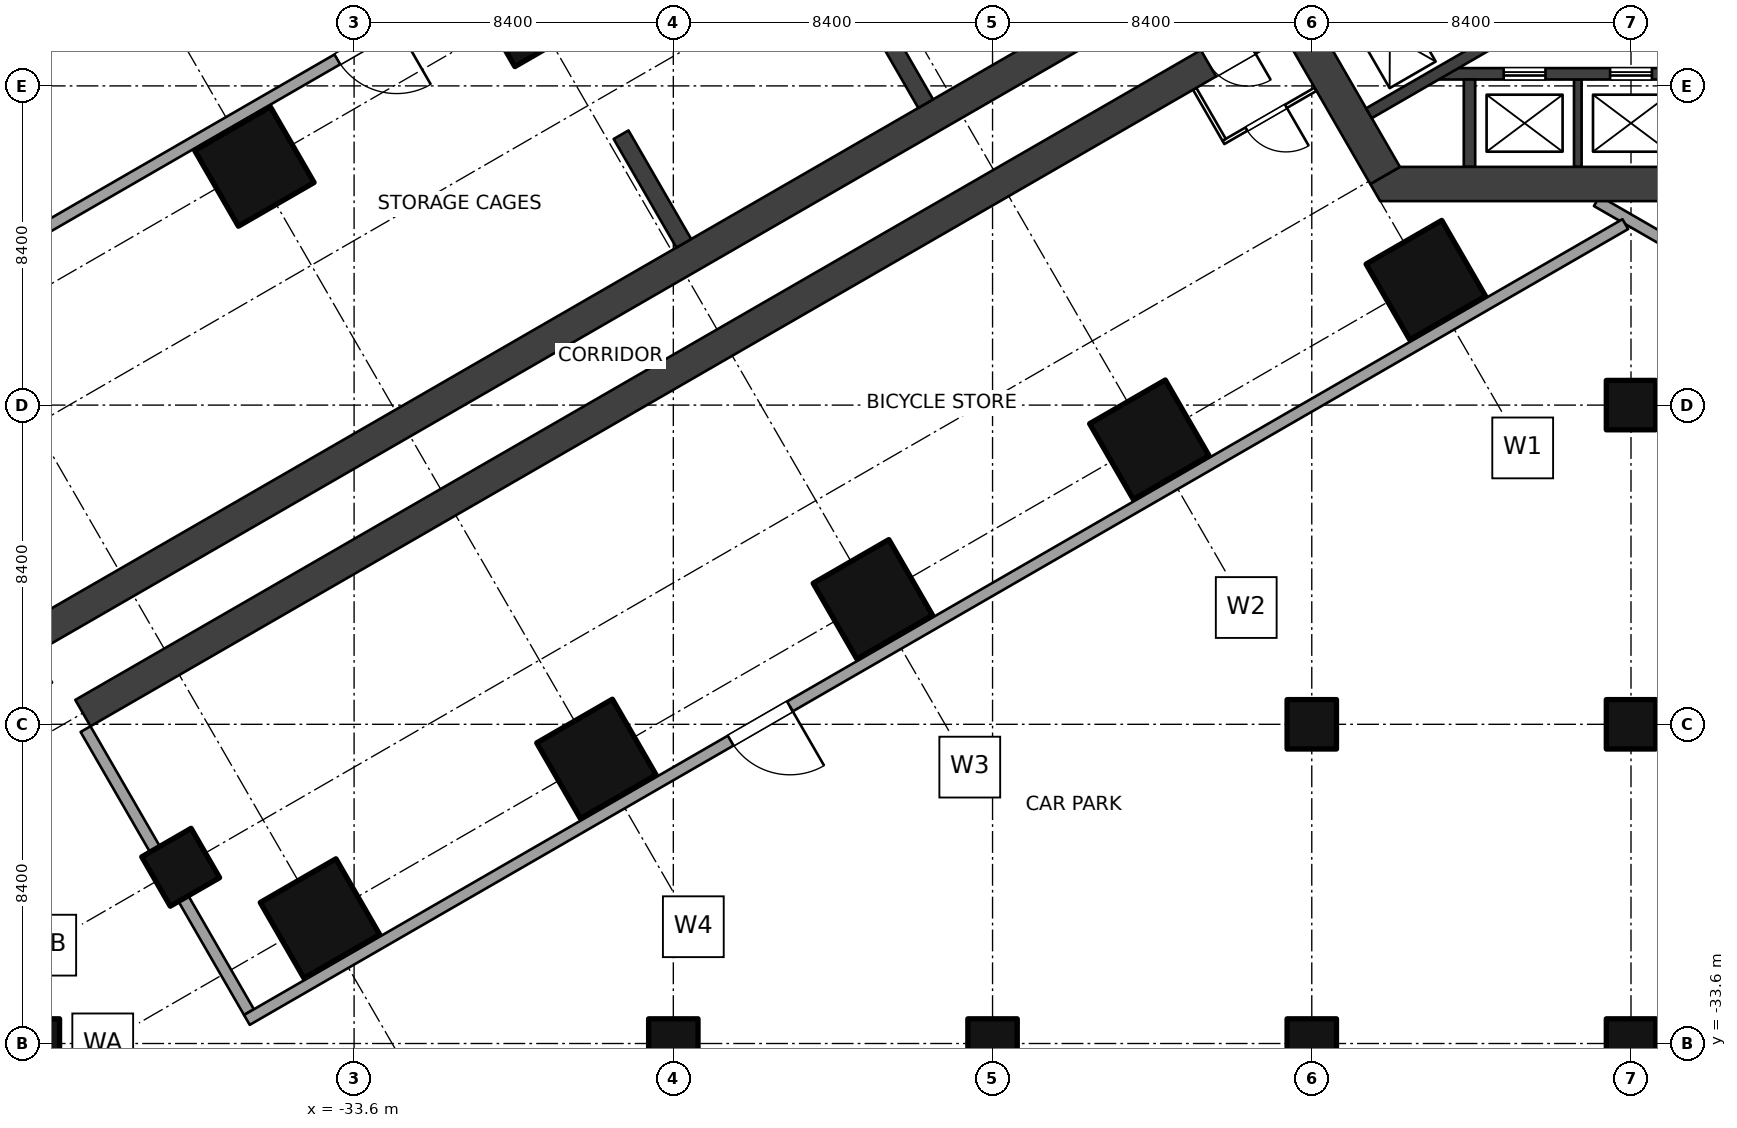
"""IFC4 building model, lengths in metres.
Left out: names, types, materials, properties, quantities, classifications, styles, units other than length and angle.
Written with IfcOpenShell. Run it as: python <this file> out.ifc"""

import sys

from ifc_helpers import new_model, si_unit, direction, frame, frame_2d, origin, origin_2d, place, context, subcontext, project, spatial, polyline, rectangle, outline, extrude, element, fill, save


model = new_model("IFC4")
c1 = context("Model", 3, precision=1e-05, world=origin(), true_north=direction((0.0, 1.0)))
c2 = subcontext(c1, "Body", "Model", "MODEL_VIEW")
j1 = project(units=[si_unit("LENGTHUNIT", "METRE"), si_unit("PLANEANGLEUNIT", "RADIAN")], contexts=[c1])
p1 = place(None, origin())
s1 = spatial("IfcSite", under=j1, at=p1, CompositionType="ELEMENT")
p2 = place(p1, origin())
s2 = spatial("IfcBuilding", under=s1, at=p2, CompositionType="ELEMENT")
p3 = place(p2, frame((0.0, 0.0, -3.5)))
s3 = spatial("IfcBuildingStorey", under=s2, at=p3, CompositionType="ELEMENT", Elevation=-3.5)
for number, where, z_axis, x_axis in (
    (1, (-5.4, -13.51, 0.0), (0.0, 0.0, 1.0), (-0.5, 0.866, 0.0)),
    (2, (-12.675, -17.71, 0.0), (0.0, 0.0, 1.0), (-0.5, 0.866, 0.0)),
    (3, (-19.949, -21.91, 0.0), (0.0, 0.0, 1.0), (-0.5, 0.866, 0.0)),
    (4, (-28.949, -6.322, 0.0), (0.0, 0.0, 1.0), (-0.5, 0.866, 0.0)),
    (5, (-27.224, -26.11, 0.0), (0.0, 0.0, 1.0), (-0.5, 0.866, 0.0)),
    (6, (-36.224, -10.521, 0.0), (0.0, 0.0, 1.0), (-0.5, 0.866, 0.0)),
    (7, (-34.499, -30.31, 0.0), (0.0, 0.0, 1.0), (-0.5, 0.866, 0.0)),
):
    element("IfcColumn", number, at=place(p3, frame(where, z_axis=z_axis, x_axis=x_axis)), inside=s3, PredefinedType="COLUMN", context=c2, shape_type="SweptSolid", body=[
        extrude(rectangle(XDim=2.3, YDim=2.3, at=origin_2d()), origin(), (0.0, 0.0, 1.0), 3.5),
    ])
p4 = place(p3, frame((-38.164, -28.962, 0.0), z_axis=(0.0, 0.0, 1.0), x_axis=(-0.5, 0.866025403784, 0.0)))
e8 = element("IfcColumn", 8, at=p4, inside=s3, PredefinedType="COLUMN", context=c2, shape_type="SweptSolid", body=[
    extrude(rectangle(XDim=1.5, YDim=1.5, at=origin_2d()), origin(), (0.0, 0.0, 1.0), 3.5),
])
for number, where, z_axis, x_axis in (
    (9, (-42.0, -33.6, 0.0), (0.0, 0.0, 1.0), (1.0, 0.0, 0.0)),
    (10, (-25.2, -33.6, 0.0), (0.0, 0.0, 1.0), (1.0, 0.0, 0.0)),
    (11, (-16.8, -33.6, 0.0), (0.0, 0.0, 1.0), (1.0, 0.0, 0.0)),
    (12, (-8.4, -33.6, 0.0), (0.0, 0.0, 1.0), (1.0, 0.0, 0.0)),
    (13, (-8.4, -25.2, 0.0), (0.0, 0.0, 1.0), (1.0, 0.0, 0.0)),
    (14, (0.0, -33.6, 0.0), (0.0, 0.0, 1.0), (1.0, 0.0, 0.0)),
    (15, (0.0, -25.2, 0.0), (0.0, 0.0, 1.0), (1.0, 0.0, 0.0)),
    (16, (0.0, -16.8, 0.0), (0.0, 0.0, 1.0), (1.0, 0.0, 0.0)),
):
    element("IfcColumn", number, at=place(p3, frame(where, z_axis=z_axis, x_axis=x_axis)), inside=s3, PredefinedType="COLUMN", context=c2, shape_type="SweptSolid", body=[
        extrude(rectangle(XDim=1.3, YDim=1.3, at=origin_2d()), origin(), (0.0, 0.0, 1.0), 3.5),
    ])
p5 = place(p3, frame((-6.47, -10.757, 0.0), z_axis=(0.0, 0.0, 1.0), x_axis=(-0.499997612506, 0.8660267822, 0.0)))
e17 = element("IfcWall", 17, at=p5, inside=s3, PredefinedType="SHEAR", context=c2, shape_type="SweptSolid", body=[
    extrude(rectangle(XDim=12.161, YDim=0.9, at=frame_2d((6.08, 0.0))), origin(), (0.0, 0.0, 1.0), 3.5),
])
p6 = place(p5, frame((5.33, 0.0, 0.0)))
e18 = element("IfcOpeningElement", 18, at=p6, cuts=e17, PredefinedType="OPENING", context=c2, shape_type="SweptSolid", body=[
    extrude(rectangle(XDim=1.5, YDim=2.1, at=frame_2d((0.75, 1.05))), frame((0.0, 0.46, 0.0), z_axis=(0.0, -1.0, 0.0), x_axis=(1.0, 0.0, 0.0)), (0.0, 0.0, 1.0), 0.92),
])
p7 = place(p3, origin())
e19 = element("IfcWall", 19, at=p7, inside=s3, PredefinedType="SHEAR", context=c2, shape_type="SweptSolid", body=[
    extrude(outline(polyline([(-6.6, -11.432), (6.6, -11.432), (6.86, -10.981), (6.08, -10.531), (-6.08, -10.531), (-6.86, -10.981), (-6.6, -11.432)])), origin(), (0.0, 0.0, 1.0), 3.5),
])
p8 = place(p3, frame((-0.919, -5.669, 0.0), z_axis=(0.0, 0.0, 1.0), x_axis=(-0.866011800373, -0.500023561059, 0.0)))
e20 = element("IfcWall", 20, at=p8, inside=s3, PredefinedType="SHEAR", context=c2, shape_type="SweptSolid", body=[
    extrude(rectangle(XDim=6.902, YDim=0.3, at=frame_2d((3.451, 0.0))), origin(), (0.0, 0.0, 1.0), 3.5),
])
p9 = place(p3, frame((5.098, -8.082, 0.0), z_axis=(0.0, 0.0, 1.0), x_axis=(-1.0, 0.0, 0.0)))
e21 = element("IfcWall", 21, at=p9, inside=s3, PredefinedType="SHEAR", context=c2, shape_type="SweptSolid", body=[
    extrude(rectangle(XDim=10.195, YDim=0.3, at=frame_2d((5.098, 0.0))), origin(), (0.0, 0.0, 1.0), 3.5),
])
p10 = place(p9, frame((1.748, 0.0, 0.0)))
e22 = element("IfcOpeningElement", 22, at=p10, cuts=e21, PredefinedType="OPENING", context=c2, shape_type="SweptSolid", body=[
    extrude(rectangle(XDim=1.1, YDim=2.1, at=frame_2d((0.55, 1.05))), frame((0.0, 0.16, 0.0), z_axis=(0.0, -1.0, 0.0), x_axis=(1.0, 0.0, 0.0)), (0.0, 0.0, 1.0), 0.32),
])
p11 = place(p9, frame((4.548, 0.0, 0.0)))
e23 = element("IfcOpeningElement", 23, at=p11, cuts=e21, PredefinedType="OPENING", context=c2, shape_type="SweptSolid", body=[
    extrude(rectangle(XDim=1.1, YDim=2.1, at=frame_2d((0.55, 1.05))), frame((0.0, 0.16, 0.0), z_axis=(0.0, -1.0, 0.0), x_axis=(1.0, 0.0, 0.0)), (0.0, 0.0, 1.0), 0.32),
])
p12 = place(p9, frame((7.348, 0.0, 0.0)))
e24 = element("IfcOpeningElement", 24, at=p12, cuts=e21, PredefinedType="OPENING", context=c2, shape_type="SweptSolid", body=[
    extrude(rectangle(XDim=1.1, YDim=2.1, at=frame_2d((0.55, 1.05))), frame((0.0, 0.16, 0.0), z_axis=(0.0, -1.0, 0.0), x_axis=(1.0, 0.0, 0.0)), (0.0, 0.0, 1.0), 0.32),
])
p13 = place(p3, frame((-4.25, -8.231, 0.0), z_axis=(0.0, 0.0, 1.0), x_axis=(0.0, -1.0, 0.0)))
e25 = element("IfcWall", 25, at=p13, inside=s3, PredefinedType="SHEAR", context=c2, shape_type="SweptSolid", body=[
    extrude(rectangle(XDim=2.3, YDim=0.3, at=frame_2d((1.15, 0.0))), origin(), (0.0, 0.0, 1.0), 3.5),
])
p14 = place(p3, frame((-1.4, -8.231, 0.0), z_axis=(0.0, 0.0, 1.0), x_axis=(0.0, -1.0, 0.0)))
e26 = element("IfcWall", 26, at=p14, inside=s3, PredefinedType="SHEAR", context=c2, shape_type="SweptSolid", body=[
    extrude(rectangle(XDim=2.3, YDim=0.2, at=frame_2d((1.15, 0.0))), origin(), (0.0, 0.0, 1.0), 3.5),
])
p15 = place(p3, frame((-8.91, -6.53, 0.0), z_axis=(0.0, 0.0, 1.0), x_axis=(-0.866025284237, -0.500000207062, 0.0)))
e27 = element("IfcWall", 27, at=p15, inside=s3, PredefinedType="SHEAR", context=c2, shape_type="SweptSolid", body=[
    extrude(rectangle(XDim=36.75, YDim=0.8, at=frame_2d((18.375, 0.0))), origin(), (0.0, 0.0, 1.0), 3.5),
])
p16 = place(p15, frame((1.35, 0.0, 0.0)))
e28 = element("IfcOpeningElement", 28, at=p16, cuts=e27, PredefinedType="OPENING", context=c2, shape_type="SweptSolid", body=[
    extrude(rectangle(XDim=1.2, YDim=2.1, at=frame_2d((0.6, 1.05))), frame((0.0, 0.41, 0.0), z_axis=(0.0, -1.0, 0.0), x_axis=(1.0, 0.0, 0.0)), (0.0, 0.0, 1.0), 0.82),
])
p17 = place(p3, frame((-10.11, -4.451, 0.0), z_axis=(0.0, 0.0, 1.0), x_axis=(-0.866025284237, -0.500000207062, 0.0)))
e29 = element("IfcWall", 29, at=p17, inside=s3, PredefinedType="SHEAR", context=c2, shape_type="SweptSolid", body=[
    extrude(rectangle(XDim=36.75, YDim=0.8, at=frame_2d((18.375, 0.0))), origin(), (0.0, 0.0, 1.0), 3.5),
])
p18 = place(p17, frame((1.35, 0.0, 0.0)))
e30 = element("IfcOpeningElement", 30, at=p18, cuts=e29, PredefinedType="OPENING", context=c2, shape_type="SweptSolid", body=[
    extrude(rectangle(XDim=1.2, YDim=2.1, at=frame_2d((0.6, 1.05))), frame((0.0, 0.41, 0.0), z_axis=(0.0, -1.0, 0.0), x_axis=(1.0, 0.0, 0.0)), (0.0, 0.0, 1.0), 0.82),
])
p19 = place(p3, frame((-8.3, -8.487, 0.0), z_axis=(0.0, 0.0, 1.0), x_axis=(-0.866034573852, -0.49998411664, 0.0)))
e31 = element("IfcWall", 31, at=p19, inside=s3, PredefinedType="PARTITIONING", context=c2, shape_type="SweptSolid", body=[
    extrude(rectangle(XDim=2.8, YDim=0.1, at=frame_2d((1.4, 0.0))), origin(), (0.0, 0.0, 1.0), 3.15),
])
p20 = place(p19, frame((0.9, 0.0, 0.0)))
e32 = element("IfcOpeningElement", 32, at=p20, cuts=e31, PredefinedType="OPENING", context=c2, shape_type="SweptSolid", body=[
    extrude(rectangle(XDim=1.2, YDim=2.1, at=frame_2d((0.6, 1.05))), frame((0.0, 0.06, 0.0), z_axis=(0.0, -1.0, 0.0), x_axis=(1.0, 0.0, 0.0)), (0.0, 0.0, 1.0), 0.12),
])
p21 = place(p3, frame((-11.482, -8.476, 0.0), z_axis=(0.0, 0.0, 1.0), x_axis=(0.500017819788, -0.86601511528, 0.0)))
e33 = element("IfcWall", 33, at=p21, inside=s3, PredefinedType="PARTITIONING", context=c2, shape_type="SweptSolid", body=[
    extrude(rectangle(XDim=1.55, YDim=0.1, at=frame_2d((0.775, 0.0))), origin(), (0.0, 0.0, 1.0), 3.15),
])
p22 = place(p3, frame((-40.667, -25.326, 0.0), z_axis=(0.0, 0.0, 1.0), x_axis=(0.500007509209, -0.866021068297, 0.0)))
e34 = element("IfcWall", 34, at=p22, inside=s3, PredefinedType="SOLIDWALL", context=c2, shape_type="SweptSolid", body=[
    extrude(rectangle(XDim=8.6, YDim=0.3, at=frame_2d((4.3, 0.0))), origin(), (0.0, 0.0, 1.0), 1.55),
])
p23 = place(p3, frame((-0.15, -12.038, 0.0), z_axis=(0.0, 0.0, 1.0), x_axis=(-0.866026292622, -0.499998460486, 0.0)))
e35 = element("IfcWall", 35, at=p23, inside=s3, PredefinedType="SOLIDWALL", context=c2, shape_type="SweptSolid", body=[
    extrude(rectangle(XDim=41.883, YDim=0.3, at=frame_2d((20.941, 0.0))), origin(), (0.0, 0.0, 1.0), 3.15),
])
p24 = place(p23, frame((25.383, 0.0, 0.0)))
e36 = element("IfcOpeningElement", 36, at=p24, cuts=e35, PredefinedType="OPENING", context=c2, shape_type="SweptSolid", body=[
    extrude(rectangle(XDim=1.8, YDim=2.4, at=frame_2d((0.9, 1.2))), frame((0.0, 0.16, 0.0), z_axis=(0.0, -1.0, 0.0), x_axis=(1.0, 0.0, 0.0)), (0.0, 0.0, 1.0), 0.32),
])
p25 = place(p3, frame((-9.45, 6.495, 0.0), z_axis=(0.0, 0.0, 1.0), x_axis=(-0.866025301493, -0.500000177174, 0.0)))
e37 = element("IfcWall", 37, at=p25, inside=s3, PredefinedType="SOLIDWALL", context=c2, shape_type="SweptSolid", body=[
    extrude(rectangle(XDim=43.095, YDim=0.3, at=frame_2d((21.548, 0.0))), origin(), (0.0, 0.0, 1.0), 3.15),
])
p26 = place(p25, frame((26.595, 0.0, 0.0)))
e38 = element("IfcOpeningElement", 38, at=p26, cuts=e37, PredefinedType="OPENING", context=c2, shape_type="SweptSolid", body=[
    extrude(rectangle(XDim=1.8, YDim=2.4, at=frame_2d((0.9, 1.2))), frame((0.0, 0.16, 0.0), z_axis=(0.0, -1.0, 0.0), x_axis=(1.0, 0.0, 0.0)), (0.0, 0.0, 1.0), 0.32),
])
p27 = place(p3, frame((-0.9, -11.432, 0.0), z_axis=(0.0, 0.0, 1.0), x_axis=(0.866025301493, -0.500000177174, 0.0)))
e39 = element("IfcWall", 39, at=p27, inside=s3, PredefinedType="SOLIDWALL", context=c2, shape_type="SweptSolid", body=[
    extrude(rectangle(XDim=43.095, YDim=0.3, at=frame_2d((21.548, 0.0))), origin(), (0.0, 0.0, 1.0), 3.15),
])
p28 = place(p27, frame((26.595, 0.0, 0.0)))
e40 = element("IfcOpeningElement", 40, at=p28, cuts=e39, PredefinedType="OPENING", context=c2, shape_type="SweptSolid", body=[
    extrude(rectangle(XDim=1.8, YDim=2.4, at=frame_2d((0.9, 1.2))), frame((0.0, 0.16, 0.0), z_axis=(0.0, -1.0, 0.0), x_axis=(1.0, 0.0, 0.0)), (0.0, 0.0, 1.0), 0.32),
])
for number, where, z_axis, x_axis in (
    (41, (-18.559, -8.868, 0.0), (0.0, 0.0, 1.0), (-0.5, 0.866, 0.0)),
    (42, (-24.925, -12.543, 0.0), (0.0, 0.0, 1.0), (-0.5, 0.866, 0.0)),
):
    element("IfcWall", number, at=place(p3, frame(where, z_axis=z_axis, x_axis=x_axis)), inside=s3, PredefinedType="SOLIDWALL", context=c2, shape_type="SweptSolid", body=[
        extrude(rectangle(XDim=3.3, YDim=0.45, at=frame_2d((1.65, 0.0))), origin(), (0.0, 0.0, 1.0), 3.5),
    ])
p29 = place(p11, origin())
e43 = element("IfcDoor", 43, at=p29, inside=s3, OperationType="DOUBLE_DOOR_SLIDING", PredefinedType="DOOR", context=c2, shape_type="SweptSolid", body=[
    extrude(rectangle(XDim=1.1, YDim=2.1, at=frame_2d((0.55, 1.05))), frame((0.0, 0.025, 0.0), z_axis=(0.0, -1.0, 0.0), x_axis=(1.0, 0.0, 0.0)), (0.0, 0.0, 1.0), 0.05),
])
fill(e23, e43)
p30 = place(p12, origin())
e44 = element("IfcDoor", 44, at=p30, inside=s3, OperationType="DOUBLE_DOOR_SLIDING", PredefinedType="DOOR", context=c2, shape_type="SweptSolid", body=[
    extrude(rectangle(XDim=1.1, YDim=2.1, at=frame_2d((0.55, 1.05))), frame((0.0, 0.025, 0.0), z_axis=(0.0, -1.0, 0.0), x_axis=(1.0, 0.0, 0.0)), (0.0, 0.0, 1.0), 0.05),
])
fill(e24, e44)
p31 = place(p16, origin())
e45 = element("IfcDoor", 45, at=p31, inside=s3, OperationType="DOUBLE_SWING_LEFT", PredefinedType="DOOR", context=c2, shape_type="SweptSolid", body=[
    extrude(rectangle(XDim=1.2, YDim=2.1, at=frame_2d((0.6, 1.05))), frame((0.0, 0.025, 0.0), z_axis=(0.0, -1.0, 0.0), x_axis=(1.0, 0.0, 0.0)), (0.0, 0.0, 1.0), 0.05),
])
fill(e28, e45)
p32 = place(p20, origin())
e46 = element("IfcDoor", 46, at=p32, inside=s3, OperationType="DOUBLE_SWING_LEFT", PredefinedType="DOOR", context=c2, shape_type="SweptSolid", body=[
    extrude(rectangle(XDim=1.2, YDim=2.1, at=frame_2d((0.6, 1.05))), frame((0.0, 0.025, 0.0), z_axis=(0.0, -1.0, 0.0), x_axis=(1.0, 0.0, 0.0)), (0.0, 0.0, 1.0), 0.05),
])
fill(e32, e46)
p33 = place(p24, origin())
e47 = element("IfcDoor", 47, at=p33, inside=s3, OperationType="DOUBLE_DOOR_DOUBLE_SWING", PredefinedType="DOOR", context=c2, shape_type="SweptSolid", body=[
    extrude(rectangle(XDim=1.8, YDim=2.4, at=frame_2d((0.9, 1.2))), frame((0.0, 0.025, 0.0), z_axis=(0.0, -1.0, 0.0), x_axis=(1.0, 0.0, 0.0)), (0.0, 0.0, 1.0), 0.05),
])
fill(e36, e47)
p34 = place(p26, origin())
e48 = element("IfcDoor", 48, at=p34, inside=s3, OperationType="DOUBLE_DOOR_DOUBLE_SWING", PredefinedType="DOOR", context=c2, shape_type="SweptSolid", body=[
    extrude(rectangle(XDim=1.8, YDim=2.4, at=frame_2d((0.9, 1.2))), frame((0.0, 0.025, 0.0), z_axis=(0.0, -1.0, 0.0), x_axis=(1.0, 0.0, 0.0)), (0.0, 0.0, 1.0), 0.05),
])
fill(e38, e48)
save(model, sys.argv[1])
